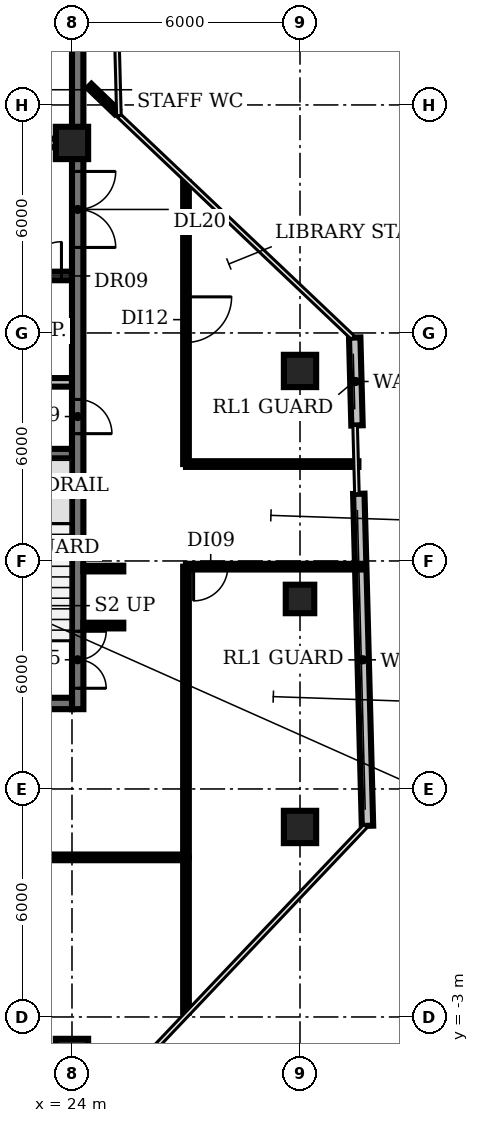
"""IFC4 building model, lengths in metres.
Left out: names, types, materials, properties, quantities, classifications, styles, units other than length and angle.
Written with IfcOpenShell. Run it as: python <this file> out.ifc"""

import sys

from ifc_helpers import new_model, si_unit, direction, frame, frame_2d, origin, origin_2d, place, context, subcontext, project, spatial, rectangle, circle, extrude, element, fill, save


model = new_model("IFC4")
c1 = context("Model", 3, precision=1e-05, world=origin(), true_north=direction((0.0, 1.0)))
c2 = subcontext(c1, "Body", "Model", "MODEL_VIEW")
j1 = project(units=[si_unit("LENGTHUNIT", "METRE"), si_unit("PLANEANGLEUNIT", "RADIAN")], contexts=[c1])
p1 = place(None, origin())
s1 = spatial("IfcSite", under=j1, at=p1, CompositionType="ELEMENT")
p2 = place(p1, origin())
s2 = spatial("IfcBuilding", under=s1, at=p2, CompositionType="ELEMENT")
p3 = place(p2, frame((0.0, 0.0, 293.6)))
s3 = spatial("IfcBuildingStorey", under=s2, at=p3, CompositionType="ELEMENT", Elevation=293.6)
for number, where, z_axis, x_axis in (
    (1, (24.0, -4.0, 0.0), (0.0, 0.0, 1.0), (1.0, 0.0, 0.0)),
    (2, (24.0, 20.0, 0.0), (0.0, 0.0, 1.0), (1.0, 0.0, 0.0)),
    (3, (30.0, 2.0, 0.0), (0.0, 0.0, 1.0), (1.0, 0.0, 0.0)),
):
    element("IfcColumn", number, at=place(p3, frame(where, z_axis=z_axis, x_axis=x_axis)), inside=s3, PredefinedType="COLUMN", context=c2, shape_type="SweptSolid", body=[
        extrude(circle(Radius=0.425, at=origin_2d()), origin(), (0.0, 0.0, 1.0), 3.85),
    ])
p4 = place(p3, frame((30.0, 8.0, 0.0), z_axis=(0.0, 0.0, 1.0), x_axis=(1.0, 0.0, 0.0)))
e4 = element("IfcColumn", 4, at=p4, inside=s3, PredefinedType="COLUMN", context=c2, shape_type="SweptSolid", body=[
    extrude(rectangle(XDim=0.75, YDim=0.75, at=origin_2d()), origin(), (0.0, 0.0, 1.0), 3.85),
])
p5 = place(p3, frame((30.0, 14.0, 0.0), z_axis=(0.0, 0.0, 1.0), x_axis=(1.0, 0.0, 0.0)))
e5 = element("IfcColumn", 5, at=p5, inside=s3, PredefinedType="COLUMN", context=c2, shape_type="SweptSolid", body=[
    extrude(circle(Radius=0.425, at=origin_2d()), origin(), (0.0, 0.0, 1.0), 3.85),
])
p6 = place(p3, frame((31.776, 2.03, 0.0), z_axis=(0.0, 0.0, 1.0), x_axis=(-0.026145807667, 0.999658139937, 0.0)))
e6 = element("IfcWall", 6, at=p6, inside=s3, PredefinedType="SOLIDWALL", context=c2, shape_type="SweptSolid", body=[
    extrude(rectangle(XDim=8.74, YDim=0.3, at=frame_2d((4.37, 0.0))), origin(), (0.0, 0.0, 1.0), 3.85),
])
p7 = place(p3, frame((31.5, 12.567, 0.0), z_axis=(0.0, 0.0, 1.0), x_axis=(-0.026173462756, 0.999657416242, 0.0)))
e7 = element("IfcWall", 7, at=p7, inside=s3, PredefinedType="SOLIDWALL", context=c2, shape_type="SweptSolid", body=[
    extrude(rectangle(XDim=2.313, YDim=0.3, at=frame_2d((1.157, 0.0))), origin(), (0.0, 0.0, 1.0), 3.85),
])
p8 = place(p3, frame((20.85, 11.825, 0.0), z_axis=(0.0, 0.0, 1.0), x_axis=(1.0, 0.0, 0.0)))
e8 = element("IfcWall", 8, at=p8, inside=s3, PredefinedType="SHEAR", context=c2, shape_type="SweptSolid", body=[
    extrude(rectangle(XDim=3.15, YDim=0.25, at=frame_2d((1.575, 0.0))), origin(), (0.0, 0.0, 1.0), 3.85),
])
p9 = place(p3, frame((16.6, 13.7, 0.0), z_axis=(0.0, 0.0, 1.0), x_axis=(1.0, 0.0, 0.0)))
e9 = element("IfcWall", 9, at=p9, inside=s3, PredefinedType="PARTITIONING", context=c2, shape_type="SweptSolid", body=[
    extrude(rectangle(XDim=7.4, YDim=0.225, at=frame_2d((3.7, 0.0))), origin(), (0.0, 0.0, 1.0), 3.85),
])
p10 = place(p3, frame((9.4, 16.5, 0.0), z_axis=(0.0, 0.0, 1.0), x_axis=(1.0, 0.0, 0.0)))
e10 = element("IfcWall", 10, at=p10, inside=s3, PredefinedType="PARTITIONING", context=c2, shape_type="SweptSolid", body=[
    extrude(rectangle(XDim=14.6, YDim=0.225, at=frame_2d((7.3, 0.0))), origin(), (0.0, 0.0, 1.0), 3.85),
])
p11 = place(p10, frame((1.9, 0.0, 0.0)))
e11 = element("IfcOpeningElement", 11, at=p11, cuts=e10, PredefinedType="OPENING", context=c2, shape_type="SweptSolid", body=[
    extrude(rectangle(XDim=1.0, YDim=2.1, at=frame_2d((0.5, 1.05))), frame((0.0, 0.123, 0.0), z_axis=(0.0, -1.0, 0.0), x_axis=(1.0, 0.0, 0.0)), (0.0, 0.0, 1.0), 0.245),
])
p12 = place(p10, frame((7.475, 0.0, 0.0)))
e12 = element("IfcOpeningElement", 12, at=p12, cuts=e10, PredefinedType="OPENING", context=c2, shape_type="SweptSolid", body=[
    extrude(rectangle(XDim=1.0, YDim=2.1, at=frame_2d((0.5, 1.05))), frame((0.0, 0.123, 0.0), z_axis=(0.0, -1.0, 0.0), x_axis=(1.0, 0.0, 0.0)), (0.0, 0.0, 1.0), 0.245),
])
p13 = place(p10, frame((11.647, 0.0, 0.0)))
e13 = element("IfcOpeningElement", 13, at=p13, cuts=e10, PredefinedType="OPENING", context=c2, shape_type="SweptSolid", body=[
    extrude(rectangle(XDim=0.9, YDim=2.1, at=frame_2d((0.45, 1.05))), frame((0.0, 0.123, 0.0), z_axis=(0.0, -1.0, 0.0), x_axis=(1.0, 0.0, 0.0)), (0.0, 0.0, 1.0), 0.245),
])
p14 = place(p10, frame((13.423, 0.0, 0.0)))
e14 = element("IfcOpeningElement", 14, at=p14, cuts=e10, PredefinedType="OPENING", context=c2, shape_type="SweptSolid", body=[
    extrude(rectangle(XDim=0.9, YDim=2.1, at=frame_2d((0.45, 1.05))), frame((0.0, 0.123, 0.0), z_axis=(0.0, -1.0, 0.0), x_axis=(1.0, 0.0, 0.0)), (0.0, 0.0, 1.0), 0.245),
])
p15 = place(p3, frame((24.0, 20.0, 0.0), z_axis=(0.0, 0.0, 1.0), x_axis=(-1.0, 0.0, 0.0)))
e15 = element("IfcWall", 15, at=p15, inside=s3, PredefinedType="PARTITIONING", context=c2, shape_type="SweptSolid", body=[
    extrude(rectangle(XDim=14.6, YDim=0.225, at=frame_2d((7.3, 0.0))), origin(), (0.0, 0.0, 1.0), 3.85),
])
p16 = place(p15, frame((12.75, 0.0, 0.0)))
e16 = element("IfcOpeningElement", 16, at=p16, cuts=e15, PredefinedType="OPENING", context=c2, shape_type="SweptSolid", body=[
    extrude(rectangle(XDim=1.1, YDim=2.1, at=frame_2d((0.55, 1.05))), frame((0.0, 0.123, 0.0), z_axis=(0.0, -1.0, 0.0), x_axis=(1.0, 0.0, 0.0)), (0.0, 0.0, 1.0), 0.245),
])
p17 = place(p15, frame((9.95, 0.0, 0.0)))
e17 = element("IfcOpeningElement", 17, at=p17, cuts=e15, PredefinedType="OPENING", context=c2, shape_type="SweptSolid", body=[
    extrude(rectangle(XDim=1.1, YDim=2.1, at=frame_2d((0.55, 1.05))), frame((0.0, 0.123, 0.0), z_axis=(0.0, -1.0, 0.0), x_axis=(1.0, 0.0, 0.0)), (0.0, 0.0, 1.0), 0.245),
])
p18 = place(p15, frame((7.15, 0.0, 0.0)))
e18 = element("IfcOpeningElement", 18, at=p18, cuts=e15, PredefinedType="OPENING", context=c2, shape_type="SweptSolid", body=[
    extrude(rectangle(XDim=1.1, YDim=2.1, at=frame_2d((0.55, 1.05))), frame((0.0, 0.123, 0.0), z_axis=(0.0, -1.0, 0.0), x_axis=(1.0, 0.0, 0.0)), (0.0, 0.0, 1.0), 0.245),
])
p19 = place(p15, frame((4.35, 0.0, 0.0)))
e19 = element("IfcOpeningElement", 19, at=p19, cuts=e15, PredefinedType="OPENING", context=c2, shape_type="SweptSolid", body=[
    extrude(rectangle(XDim=1.1, YDim=2.1, at=frame_2d((0.55, 1.05))), frame((0.0, 0.123, 0.0), z_axis=(0.0, -1.0, 0.0), x_axis=(1.0, 0.0, 0.0)), (0.0, 0.0, 1.0), 0.245),
])
p20 = place(p15, frame((2.137, 0.0, 0.0)))
e20 = element("IfcOpeningElement", 20, at=p20, cuts=e15, PredefinedType="OPENING", context=c2, shape_type="SweptSolid", body=[
    extrude(rectangle(XDim=0.9, YDim=2.1, at=frame_2d((0.45, 1.05))), frame((0.0, 0.123, 0.0), z_axis=(0.0, -1.0, 0.0), x_axis=(1.0, 0.0, 0.0)), (0.0, 0.0, 1.0), 0.245),
])
p21 = place(p15, frame((0.612, 0.0, 0.0)))
e21 = element("IfcOpeningElement", 21, at=p21, cuts=e15, PredefinedType="OPENING", context=c2, shape_type="SweptSolid", body=[
    extrude(rectangle(XDim=0.9, YDim=2.1, at=frame_2d((0.45, 1.05))), frame((0.0, 0.123, 0.0), z_axis=(0.0, -1.0, 0.0), x_axis=(1.0, 0.0, 0.0)), (0.0, 0.0, 1.0), 0.245),
])
p22 = place(p3, frame((24.15, 25.655, 0.0), z_axis=(0.0, 0.0, 1.0), x_axis=(0.0, -1.0, 0.0)))
e22 = element("IfcWall", 22, at=p22, inside=s3, PredefinedType="SHEAR", context=c2, shape_type="SweptSolid", body=[
    extrude(rectangle(XDim=20.555, YDim=0.3, at=frame_2d((10.277, 0.0))), origin(), (0.0, 0.0, 1.0), 3.85),
])
p23 = place(p22, frame((18.505, 0.0, 0.0)))
e23 = element("IfcOpeningElement", 23, at=p23, cuts=e22, PredefinedType="OPENING", context=c2, shape_type="SweptSolid", body=[
    extrude(rectangle(XDim=1.5, YDim=2.1, at=frame_2d((0.75, 1.05))), frame((0.0, 0.16, 0.0), z_axis=(0.0, -1.0, 0.0), x_axis=(1.0, 0.0, 0.0)), (0.0, 0.0, 1.0), 0.32),
])
p24 = place(p22, frame((12.405, 0.0, 0.0)))
e24 = element("IfcOpeningElement", 24, at=p24, cuts=e22, PredefinedType="OPENING", context=c2, shape_type="SweptSolid", body=[
    extrude(rectangle(XDim=0.9, YDim=2.1, at=frame_2d((0.45, 1.05))), frame((0.0, 0.16, 0.0), z_axis=(0.0, -1.0, 0.0), x_axis=(1.0, 0.0, 0.0)), (0.0, 0.0, 1.0), 0.32),
])
p25 = place(p22, frame((6.405, 0.0, 0.0)))
e25 = element("IfcOpeningElement", 25, at=p25, cuts=e22, PredefinedType="OPENING", context=c2, shape_type="SweptSolid", body=[
    extrude(rectangle(XDim=2.0, YDim=2.1, at=frame_2d((1.0, 1.05))), frame((0.0, 0.16, 0.0), z_axis=(0.0, -1.0, 0.0), x_axis=(1.0, 0.0, 0.0)), (0.0, 0.0, 1.0), 0.32),
])
p26 = place(p3, frame((24.0, 5.25, 0.0), z_axis=(0.0, 0.0, 1.0), x_axis=(-1.0, 0.0, 0.0)))
e26 = element("IfcWall", 26, at=p26, inside=s3, PredefinedType="SHEAR", context=c2, shape_type="SweptSolid", body=[
    extrude(rectangle(XDim=18.0, YDim=0.3, at=frame_2d((9.0, 0.0))), origin(), (0.0, 0.0, 1.0), 3.85),
])
p27 = place(p26, frame((13.0, 0.0, 0.0)))
e27 = element("IfcOpeningElement", 27, at=p27, cuts=e26, PredefinedType="OPENING", context=c2, shape_type="SweptSolid", body=[
    extrude(rectangle(XDim=1.2, YDim=2.1, at=frame_2d((0.6, 1.05))), frame((0.0, 0.16, 0.0), z_axis=(0.0, -1.0, 0.0), x_axis=(1.0, 0.0, 0.0)), (0.0, 0.0, 1.0), 0.32),
])
p28 = place(p26, frame((4.9, 0.0, 0.0)))
e28 = element("IfcOpeningElement", 28, at=p28, cuts=e26, PredefinedType="OPENING", context=c2, shape_type="SweptSolid", body=[
    extrude(rectangle(XDim=1.0, YDim=2.1, at=frame_2d((0.5, 1.05))), frame((0.0, 0.16, 0.0), z_axis=(0.0, -1.0, 0.0), x_axis=(1.0, 0.0, 0.0)), (0.0, 0.0, 1.0), 0.32),
])
for number, where, z_axis, x_axis in (
    (29, (24.3, 7.3, 0.0), (0.0, 0.0, 1.0), (1.0, 0.0, 0.0)),
    (30, (24.3, 8.8, 0.0), (0.0, 0.0, 1.0), (1.0, 0.0, 0.0)),
):
    element("IfcWall", number, at=place(p3, frame(where, z_axis=z_axis, x_axis=x_axis)), inside=s3, PredefinedType="PARTITIONING", context=c2, shape_type="SweptSolid", body=[
        extrude(rectangle(XDim=1.05, YDim=0.15, at=frame_2d((0.525, 0.0))), origin(), (0.0, 0.0, 1.0), 2.9),
    ])
p29 = place(p3, frame((24.46, 21.5, 0.0), z_axis=(0.0, 0.0, 1.0), x_axis=(0.720809322513, -0.69313340749, 0.0)))
e31 = element("IfcWall", 31, at=p29, inside=s3, PredefinedType="PARTITIONING", context=c2, shape_type="SweptSolid", body=[
    extrude(rectangle(XDim=0.988, YDim=0.15, at=frame_2d((0.494, 0.0))), origin(), (0.0, 0.0, 1.0), 2.9),
])
p30 = place(p3, frame((27.0, -2.88, 0.0), z_axis=(0.0, 0.0, 1.0), x_axis=(0.0, 1.0, 0.0)))
e32 = element("IfcWall", 32, at=p30, inside=s3, PredefinedType="PARTITIONING", context=c2, shape_type="SweptSolid", body=[
    extrude(rectangle(XDim=4.08, YDim=0.15, at=frame_2d((2.04, 0.0))), origin(), (0.0, 0.0, 1.0), 2.9),
])
p31 = place(p3, frame((27.0, 1.2, 0.0), z_axis=(0.0, 0.0, 1.0), x_axis=(-1.0, 0.0, 0.0)))
e33 = element("IfcWall", 33, at=p31, inside=s3, PredefinedType="PARTITIONING", context=c2, shape_type="SweptSolid", body=[
    extrude(rectangle(XDim=24.0, YDim=0.15, at=frame_2d((12.0, 0.0))), origin(), (0.0, 0.0, 1.0), 2.9),
])
p32 = place(p31, frame((11.5, 0.0, 0.0)))
e34 = element("IfcOpeningElement", 34, at=p32, cuts=e33, PredefinedType="OPENING", context=c2, shape_type="SweptSolid", body=[
    extrude(rectangle(XDim=1.2, YDim=2.1, at=frame_2d((0.6, 1.05))), frame((0.0, 0.085, 0.0), z_axis=(0.0, -1.0, 0.0), x_axis=(1.0, 0.0, 0.0)), (0.0, 0.0, 1.0), 0.17),
])
p33 = place(p3, frame((27.0, 1.2, 0.0), z_axis=(0.0, 0.0, 1.0), x_axis=(0.0, 1.0, 0.0)))
e35 = element("IfcWall", 35, at=p33, inside=s3, PredefinedType="PARTITIONING", context=c2, shape_type="SweptSolid", body=[
    extrude(rectangle(XDim=7.65, YDim=0.15, at=frame_2d((3.825, 0.0))), origin(), (0.0, 0.0, 1.0), 2.9),
])
p34 = place(p3, frame((27.0, 11.55, 0.0), z_axis=(0.0, 0.0, 1.0), x_axis=(1.0, 0.0, 0.0)))
e36 = element("IfcWall", 36, at=p34, inside=s3, PredefinedType="PARTITIONING", context=c2, shape_type="SweptSolid", body=[
    extrude(rectangle(XDim=4.537, YDim=0.15, at=frame_2d((2.269, 0.0))), origin(), (0.0, 0.0, 1.0), 2.9),
])
p35 = place(p3, frame((27.0, 18.97, 0.0), z_axis=(0.0, 0.0, 1.0), x_axis=(0.0, -1.0, 0.0)))
e37 = element("IfcWall", 37, at=p35, inside=s3, PredefinedType="PARTITIONING", context=c2, shape_type="SweptSolid", body=[
    extrude(rectangle(XDim=7.42, YDim=0.15, at=frame_2d((3.71, 0.0))), origin(), (0.0, 0.0, 1.0), 2.9),
])
p36 = place(p35, frame((3.02, 0.0, 0.0)))
e38 = element("IfcOpeningElement", 38, at=p36, cuts=e37, PredefinedType="OPENING", context=c2, shape_type="SweptSolid", body=[
    extrude(rectangle(XDim=1.2, YDim=2.1, at=frame_2d((0.6, 1.05))), frame((0.0, 0.085, 0.0), z_axis=(0.0, -1.0, 0.0), x_axis=(1.0, 0.0, 0.0)), (0.0, 0.0, 1.0), 0.17),
])
p37 = place(p3, frame((31.607, 8.85, 0.0), z_axis=(0.0, 0.0, 1.0), x_axis=(-1.0, 0.0, 0.0)))
e39 = element("IfcWall", 39, at=p37, inside=s3, PredefinedType="PARTITIONING", context=c2, shape_type="SweptSolid", body=[
    extrude(rectangle(XDim=4.607, YDim=0.15, at=frame_2d((2.304, 0.0))), origin(), (0.0, 0.0, 1.0), 2.9),
])
p38 = place(p37, frame((3.508, 0.0, 0.0)))
e40 = element("IfcOpeningElement", 40, at=p38, cuts=e39, PredefinedType="OPENING", context=c2, shape_type="SweptSolid", body=[
    extrude(rectangle(XDim=0.9, YDim=2.1, at=frame_2d((0.45, 1.05))), frame((0.0, 0.085, 0.0), z_axis=(0.0, -1.0, 0.0), x_axis=(1.0, 0.0, 0.0)), (0.0, 0.0, 1.0), 0.17),
])
p39 = place(p14, origin())
e41 = element("IfcDoor", 41, at=p39, inside=s3, OperationType="SINGLE_SWING_RIGHT", PredefinedType="DOOR", context=c2, shape_type="SweptSolid", body=[
    extrude(rectangle(XDim=0.9, YDim=2.1, at=frame_2d((0.45, 1.05))), frame((0.0, 0.025, 0.0), z_axis=(0.0, -1.0, 0.0), x_axis=(1.0, 0.0, 0.0)), (0.0, 0.0, 1.0), 0.05),
])
fill(e14, e41)
p40 = place(p23, origin())
e42 = element("IfcDoor", 42, at=p40, inside=s3, OperationType="DOUBLE_DOOR_SINGLE_SWING", PredefinedType="DOOR", context=c2, shape_type="SweptSolid", body=[
    extrude(rectangle(XDim=1.5, YDim=2.1, at=frame_2d((0.75, 1.05))), frame((0.0, 0.025, 0.0), z_axis=(0.0, -1.0, 0.0), x_axis=(1.0, 0.0, 0.0)), (0.0, 0.0, 1.0), 0.05),
])
fill(e23, e42)
p41 = place(p24, origin())
e43 = element("IfcDoor", 43, at=p41, inside=s3, OperationType="SINGLE_SWING_RIGHT", PredefinedType="DOOR", context=c2, shape_type="SweptSolid", body=[
    extrude(rectangle(XDim=0.9, YDim=2.1, at=frame_2d((0.45, 1.05))), frame((0.0, 0.025, 0.0), z_axis=(0.0, -1.0, 0.0), x_axis=(1.0, 0.0, 0.0)), (0.0, 0.0, 1.0), 0.05),
])
fill(e24, e43)
p42 = place(p25, origin())
e44 = element("IfcDoor", 44, at=p42, inside=s3, OperationType="DOUBLE_DOOR_SINGLE_SWING", PredefinedType="DOOR", context=c2, shape_type="SweptSolid", body=[
    extrude(rectangle(XDim=2.0, YDim=2.1, at=frame_2d((1.0, 1.05))), frame((0.0, 0.025, 0.0), z_axis=(0.0, -1.0, 0.0), x_axis=(1.0, 0.0, 0.0)), (0.0, 0.0, 1.0), 0.05),
])
fill(e25, e44)
p43 = place(p36, origin())
e45 = element("IfcDoor", 45, at=p43, inside=s3, OperationType="SINGLE_SWING_LEFT", PredefinedType="DOOR", context=c2, shape_type="SweptSolid", body=[
    extrude(rectangle(XDim=1.2, YDim=2.1, at=frame_2d((0.6, 1.05))), frame((0.0, 0.025, 0.0), z_axis=(0.0, -1.0, 0.0), x_axis=(1.0, 0.0, 0.0)), (0.0, 0.0, 1.0), 0.05),
])
fill(e38, e45)
p44 = place(p38, origin())
e46 = element("IfcDoor", 46, at=p44, inside=s3, OperationType="SINGLE_SWING_RIGHT", PredefinedType="DOOR", context=c2, shape_type="SweptSolid", body=[
    extrude(rectangle(XDim=0.9, YDim=2.1, at=frame_2d((0.45, 1.05))), frame((0.0, 0.025, 0.0), z_axis=(0.0, -1.0, 0.0), x_axis=(1.0, 0.0, 0.0)), (0.0, 0.0, 1.0), 0.05),
])
fill(e40, e46)
save(model, sys.argv[1])
